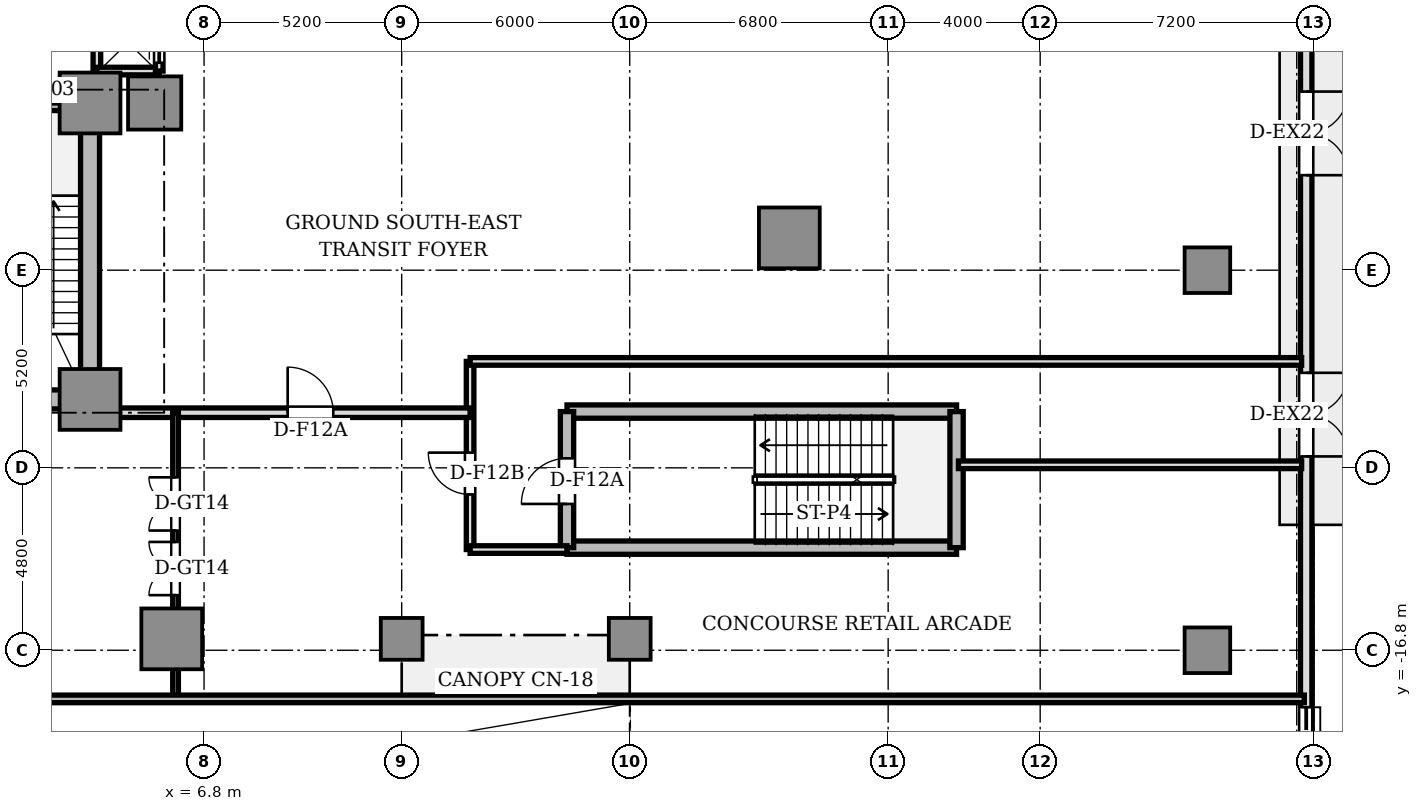
"""IFC4 building model, lengths in metres.
Left out: names, types, materials, properties, quantities, classifications, styles, units other than length and angle.
Written with IfcOpenShell. Run it as: python <this file> out.ifc"""

import sys

from ifc_helpers import new_model, si_unit, direction, frame, frame_2d, origin, origin_2d, place, context, subcontext, project, spatial, rectangle, circle, extrude, source, transform, mapped, element, fill, save


model = new_model("IFC4")
c1 = context("Model", 3, precision=1e-05, world=origin(), true_north=direction((0.0, 1.0)))
c2 = subcontext(c1, "Body", "Model", "MODEL_VIEW")
j1 = project(units=[si_unit("LENGTHUNIT", "METRE"), si_unit("PLANEANGLEUNIT", "RADIAN")], contexts=[c1])
p1 = place(None, origin())
s1 = spatial("IfcSite", under=j1, at=p1, CompositionType="ELEMENT")
p2 = place(p1, origin())
s2 = spatial("IfcBuilding", under=s1, at=p2, CompositionType="ELEMENT")
p3 = place(p2, origin())
s3 = spatial("IfcBuildingStorey", under=s2, at=p3, CompositionType="ELEMENT", Elevation=0.0)
p4 = place(p3, frame((-3.55, -10.2, 0.0), z_axis=(0.0, 0.0, 1.0), x_axis=(1.0, 0.0, 0.0)))
e1 = element("IfcWall", 1, at=p4, inside=s3, PredefinedType="SHEAR", context=c2, shape_type="SweptSolid", body=[
    extrude(rectangle(XDim=7.1, YDim=0.5, at=frame_2d((3.55, 0.0))), origin(), (0.0, 0.0, 1.0), 4.48),
])
p5 = place(p3, frame((3.8, -9.75, 0.0), z_axis=(0.0, 0.0, 1.0), x_axis=(0.0, 1.0, 0.0)))
e2 = element("IfcWall", 2, at=p5, inside=s3, PredefinedType="SHEAR", context=c2, shape_type="SweptSolid", body=[
    extrude(rectangle(XDim=6.9, YDim=0.5, at=frame_2d((3.45, 0.0))), origin(), (0.0, 0.0, 1.0), 4.48),
])
m1 = source(origin(), c2, "Body", "SweptSolid", [
    extrude(rectangle(XDim=1.6, YDim=1.6, at=origin_2d()), origin(), (0.0, 0.0, 1.0), 4.48),
])
for number, where, z_axis, x_axis in (
    (3, (3.8, -2.4, 0.0), (0.0, 0.0, 1.0), (1.0, 0.0, 0.0)),
    (4, (3.8, -10.2, 0.0), (0.0, 0.0, 1.0), (1.0, 0.0, 0.0)),
):
    element("IfcColumn", number, at=place(p3, frame(where, z_axis=z_axis, x_axis=x_axis)), inside=s3, PredefinedType="COLUMN", context=c2, shape_type="MappedRepresentation", body=[
        mapped(m1, transform((0.0, 0.0, 0.0), scale=1.0)),
    ])
m2 = source(origin(), c2, "Body", "SweptSolid", [
    extrude(rectangle(XDim=1.4, YDim=1.4, at=origin_2d()), origin(), (0.0, 0.0, 1.0), 4.48),
])
p6 = place(p3, frame((5.5, -2.4, 0.0), z_axis=(0.0, 0.0, 1.0), x_axis=(1.0, 0.0, 0.0)))
e5 = element("IfcColumn", 5, at=p6, inside=s3, PredefinedType="COLUMN", context=c2, shape_type="MappedRepresentation", body=[
    mapped(m2, transform((0.0, 0.0, 0.0), scale=1.0)),
])
for number, where, z_axis, x_axis in (
    (6, (22.2, -5.95, 0.0), (0.0, 0.0, 1.0), (1.0, 0.0, 0.0)),
    (7, (5.95, -16.5, 0.0), (0.0, 0.0, 1.0), (1.0, 0.0, 0.0)),
):
    element("IfcColumn", number, at=place(p3, frame(where, z_axis=z_axis, x_axis=x_axis)), inside=s3, PredefinedType="COLUMN", context=c2, shape_type="MappedRepresentation", body=[
        mapped(m1, transform((0.0, 0.0, 0.0), scale=1.0)),
    ])
m3 = source(origin(), c2, "Body", "SweptSolid", [
    extrude(rectangle(XDim=1.2, YDim=1.2, at=origin_2d()), origin(), (0.0, 0.0, 1.0), 4.48),
])
for number, where, z_axis, x_axis in (
    (8, (33.2, -16.8, 0.0), (0.0, 0.0, 1.0), (1.0, 0.0, 0.0)),
    (9, (33.2, -6.8, 0.0), (0.0, 0.0, 1.0), (1.0, 0.0, 0.0)),
):
    element("IfcColumn", number, at=place(p3, frame(where, z_axis=z_axis, x_axis=x_axis)), inside=s3, PredefinedType="COLUMN", context=c2, shape_type="MappedRepresentation", body=[
        mapped(m3, transform((0.0, 0.0, 0.0), scale=1.0)),
    ])
m4 = source(origin(), c2, "Body", "SweptSolid", [
    extrude(circle(Radius=0.55, at=origin_2d()), origin(), (0.0, 0.0, 1.0), 4.48),
])
for number, where, z_axis, x_axis in (
    (10, (12.0, -16.5, 0.0), (0.0, 0.0, 1.0), (1.0, 0.0, 0.0)),
    (11, (18.0, -16.5, 0.0), (0.0, 0.0, 1.0), (1.0, 0.0, 0.0)),
):
    element("IfcColumn", number, at=place(p3, frame(where, z_axis=z_axis, x_axis=x_axis)), inside=s3, PredefinedType="COLUMN", context=c2, shape_type="MappedRepresentation", body=[
        mapped(m4, transform((0.0, 0.0, 0.0), scale=1.0)),
    ])
p7 = place(p3, frame((35.8, 22.6, 0.0), z_axis=(0.0, 0.0, 1.0), x_axis=(0.0, -1.0, 0.0)))
e12 = element("IfcWall", 12, at=p7, inside=s3, PredefinedType="STANDARD", context=c2, shape_type="SweptSolid", body=[
    extrude(rectangle(XDim=47.1, YDim=0.3, at=frame_2d((23.55, 0.0))), origin(), (0.0, 0.0, 1.0), 3.8),
])
p8 = place(p7, frame((10.9, 0.0, 0.0)))
e13 = element("IfcOpeningElement", 13, at=p8, cuts=e12, PredefinedType="OPENING", context=c2, shape_type="SweptSolid", body=[
    extrude(rectangle(XDim=2.2, YDim=2.4, at=frame_2d((1.1, 1.2))), frame((0.0, 0.16, 0.0), z_axis=(0.0, -1.0, 0.0), x_axis=(1.0, 0.0, 0.0)), (0.0, 0.0, 1.0), 0.32),
])
p9 = place(p7, frame((13.24, 0.0, 0.0)))
e14 = element("IfcOpeningElement", 14, at=p9, cuts=e12, PredefinedType="OPENING", context=c2, shape_type="SweptSolid", body=[
    extrude(rectangle(XDim=2.2, YDim=2.4, at=frame_2d((1.1, 1.2))), frame((0.0, 0.16, 0.0), z_axis=(0.0, -1.0, 0.0), x_axis=(1.0, 0.0, 0.0)), (0.0, 0.0, 1.0), 0.32),
])
p10 = place(p7, frame((24.7, 0.0, 0.0)))
e15 = element("IfcOpeningElement", 15, at=p10, cuts=e12, PredefinedType="OPENING", context=c2, shape_type="SweptSolid", body=[
    extrude(rectangle(XDim=2.2, YDim=2.4, at=frame_2d((1.1, 1.2))), frame((0.0, 0.16, 0.0), z_axis=(0.0, -1.0, 0.0), x_axis=(1.0, 0.0, 0.0)), (0.0, 0.0, 1.0), 0.32),
])
p11 = place(p7, frame((32.1, 0.0, 0.0)))
e16 = element("IfcOpeningElement", 16, at=p11, cuts=e12, PredefinedType="OPENING", context=c2, shape_type="SweptSolid", body=[
    extrude(rectangle(XDim=2.2, YDim=2.4, at=frame_2d((1.1, 1.2))), frame((0.0, 0.16, 0.0), z_axis=(0.0, -1.0, 0.0), x_axis=(1.0, 0.0, 0.0)), (0.0, 0.0, 1.0), 0.32),
])
p12 = place(p7, frame((40.9, 0.0, 0.0)))
e17 = element("IfcOpeningElement", 17, at=p12, cuts=e12, PredefinedType="OPENING", context=c2, shape_type="SweptSolid", body=[
    extrude(rectangle(XDim=6.0, YDim=2.8, at=frame_2d((3.0, 1.4))), frame((0.0, 0.16, 0.0), z_axis=(0.0, -1.0, 0.0), x_axis=(1.0, 0.0, 0.0)), (0.0, 0.0, 1.0), 0.32),
])
p13 = place(p3, frame((0.0, -2.5, 0.0), z_axis=(0.0, 0.0, 1.0), x_axis=(1.0, 0.0, 0.0)))
e18 = element("IfcWall", 18, at=p13, inside=s3, PredefinedType="SOLIDWALL", context=c2, shape_type="SweptSolid", body=[
    extrude(rectangle(XDim=3.72, YDim=0.2, at=frame_2d((1.86, 0.0))), origin(), (0.0, 0.0, 1.0), 4.48),
])
p14 = place(p3, frame((3.98, -1.56, 0.0), z_axis=(0.0, 0.0, 1.0), x_axis=(0.0, 1.0, 0.0)))
e19 = element("IfcWall", 19, at=p14, inside=s3, PredefinedType="SOLIDWALL", context=c2, shape_type="SweptSolid", body=[
    extrude(rectangle(XDim=3.12, YDim=0.2, at=frame_2d((1.56, 0.0))), origin(), (0.0, 0.0, 1.0), 3.55),
])
p15 = place(p3, frame((3.98, -1.56, 0.0), z_axis=(0.0, 0.0, 1.0), x_axis=(1.0, 0.0, 0.0)))
e20 = element("IfcWall", 20, at=p15, inside=s3, PredefinedType="SOLIDWALL", context=c2, shape_type="SweptSolid", body=[
    extrude(rectangle(XDim=1.64, YDim=0.2, at=frame_2d((0.82, 0.0))), origin(), (0.0, 0.0, 1.0), 4.03),
])
p16 = place(p3, frame((5.62, -1.56, 0.0), z_axis=(0.0, 0.0, 1.0), x_axis=(0.0, 1.0, 0.0)))
e21 = element("IfcWall", 21, at=p16, inside=s3, PredefinedType="SOLIDWALL", context=c2, shape_type="SweptSolid", body=[
    extrude(rectangle(XDim=1.56, YDim=0.2, at=frame_2d((0.78, 0.0))), origin(), (0.0, 0.0, 1.0), 4.03),
])
p17 = place(p16, frame((0.22, 0.0, 0.0)))
e22 = element("IfcOpeningElement", 22, at=p17, cuts=e21, PredefinedType="OPENING", context=c2, shape_type="SweptSolid", body=[
    extrude(rectangle(XDim=1.1, YDim=2.2, at=frame_2d((0.55, 1.1))), frame((0.0, 0.11, 0.0), z_axis=(0.0, -1.0, 0.0), x_axis=(1.0, 0.0, 0.0)), (0.0, 0.0, 1.0), 0.22),
])
for number, where, z_axis, x_axis in (
    (23, (16.35, -10.52, 0.0), (0.0, 0.0, 1.0), (1.0, 0.0, 0.0)),
    (24, (16.35, -14.1, 0.0), (0.0, 0.0, 1.0), (1.0, 0.0, 0.0)),
):
    element("IfcWall", number, at=place(p3, frame(where, z_axis=z_axis, x_axis=x_axis)), inside=s3, PredefinedType="SHEAR", context=c2, shape_type="SweptSolid", body=[
        extrude(rectangle(XDim=10.25, YDim=0.35, at=frame_2d((5.125, 0.0))), origin(), (0.0, 0.0, 1.0), 4.48),
    ])
p18 = place(p3, frame((16.35, -14.1, 0.0), z_axis=(0.0, 0.0, 1.0), x_axis=(0.0, 1.0, 0.0)))
e25 = element("IfcWall", 25, at=p18, inside=s3, PredefinedType="SHEAR", context=c2, shape_type="SweptSolid", body=[
    extrude(rectangle(XDim=3.58, YDim=0.35, at=frame_2d((1.79, 0.0))), origin(), (0.0, 0.0, 1.0), 4.48),
])
p19 = place(p18, frame((1.15, 0.0, 0.0)))
e26 = element("IfcOpeningElement", 26, at=p19, cuts=e25, PredefinedType="OPENING", context=c2, shape_type="SweptSolid", body=[
    extrude(rectangle(XDim=1.2, YDim=2.2, at=frame_2d((0.6, 1.1))), frame((0.0, 0.185, 0.0), z_axis=(0.0, -1.0, 0.0), x_axis=(1.0, 0.0, 0.0)), (0.0, 0.0, 1.0), 0.37),
])
p20 = place(p3, frame((26.6, -14.1, 0.0), z_axis=(0.0, 0.0, 1.0), x_axis=(0.0, 1.0, 0.0)))
e27 = element("IfcWall", 27, at=p20, inside=s3, PredefinedType="SHEAR", context=c2, shape_type="SweptSolid", body=[
    extrude(rectangle(XDim=3.58, YDim=0.35, at=frame_2d((1.79, 0.0))), origin(), (0.0, 0.0, 1.0), 4.48),
])
p21 = place(p3, frame((13.8, -14.15, 0.0), z_axis=(0.0, 0.0, 1.0), x_axis=(0.0, 1.0, 0.0)))
e28 = element("IfcWall", 28, at=p21, inside=s3, PredefinedType="SOLIDWALL", context=c2, shape_type="SweptSolid", body=[
    extrude(rectangle(XDim=4.95, YDim=0.2, at=frame_2d((2.475, 0.0))), origin(), (0.0, 0.0, 1.0), 4.03),
])
p22 = place(p21, frame((1.45, 0.0, 0.0)))
e29 = element("IfcOpeningElement", 29, at=p22, cuts=e28, PredefinedType="OPENING", context=c2, shape_type="SweptSolid", body=[
    extrude(rectangle(XDim=1.1, YDim=2.15, at=frame_2d((0.55, 1.075))), frame((0.0, 0.11, 0.0), z_axis=(0.0, -1.0, 0.0), x_axis=(1.0, 0.0, 0.0)), (0.0, 0.0, 1.0), 0.22),
])
p23 = place(p3, frame((13.8, -14.15, 0.0), z_axis=(0.0, 0.0, 1.0), x_axis=(1.0, 0.0, 0.0)))
e30 = element("IfcWall", 30, at=p23, inside=s3, PredefinedType="SOLIDWALL", context=c2, shape_type="SweptSolid", body=[
    extrude(rectangle(XDim=2.55, YDim=0.2, at=frame_2d((1.275, 0.0))), origin(), (0.0, 0.0, 1.0), 4.03),
])
p24 = place(p3, frame((13.8, -9.2, 0.0), z_axis=(0.0, 0.0, 1.0), x_axis=(1.0, 0.0, 0.0)))
e31 = element("IfcWall", 31, at=p24, inside=s3, PredefinedType="SOLIDWALL", context=c2, shape_type="SweptSolid", body=[
    extrude(rectangle(XDim=21.88, YDim=0.2, at=frame_2d((10.94, 0.0))), origin(), (0.0, 0.0, 1.0), 3.95),
])
p25 = place(p3, frame((26.65, -11.92, 0.0), z_axis=(0.0, 0.0, 1.0), x_axis=(1.0, 0.0, 0.0)))
e32 = element("IfcWall", 32, at=p25, inside=s3, PredefinedType="SOLIDWALL", context=c2, shape_type="SweptSolid", body=[
    extrude(rectangle(XDim=9.03, YDim=0.2, at=frame_2d((4.515, 0.0))), origin(), (0.0, 0.0, 1.0), 4.03),
])
p26 = place(p3, frame((4.0, -10.55, 0.0), z_axis=(0.0, 0.0, 1.0), x_axis=(1.0, 0.0, 0.0)))
e33 = element("IfcWall", 33, at=p26, inside=s3, PredefinedType="SOLIDWALL", context=c2, shape_type="SweptSolid", body=[
    extrude(rectangle(XDim=9.8, YDim=0.25, at=frame_2d((4.9, 0.0))), origin(), (0.0, 0.0, 1.0), 4.03),
])
p27 = place(p26, frame((5.0, 0.0, 0.0)))
e34 = element("IfcOpeningElement", 34, at=p27, cuts=e33, PredefinedType="OPENING", context=c2, shape_type="SweptSolid", body=[
    extrude(rectangle(XDim=1.2, YDim=2.2, at=frame_2d((0.6, 1.1))), frame((0.0, 0.135, 0.0), z_axis=(0.0, -1.0, 0.0), x_axis=(1.0, 0.0, 0.0)), (0.0, 0.0, 1.0), 0.27),
])
p28 = place(p3, frame((6.05, -18.05, 0.0), z_axis=(0.0, 0.0, 1.0), x_axis=(0.0, 1.0, 0.0)))
e35 = element("IfcWall", 35, at=p28, inside=s3, PredefinedType="PARTITIONING", context=c2, shape_type="SweptSolid", body=[
    extrude(rectangle(XDim=7.5, YDim=0.15, at=frame_2d((3.75, 0.0))), origin(), (0.0, 0.0, 1.0), 3.85),
])
p29 = place(p28, frame((2.7, 0.0, 0.0)))
e36 = element("IfcOpeningElement", 36, at=p29, cuts=e35, PredefinedType="OPENING", context=c2, shape_type="SweptSolid", body=[
    extrude(rectangle(XDim=1.4, YDim=2.1, at=frame_2d((0.7, 1.05))), frame((0.0, 0.085, 0.0), z_axis=(0.0, -1.0, 0.0), x_axis=(1.0, 0.0, 0.0)), (0.0, 0.0, 1.0), 0.17),
])
p30 = place(p28, frame((4.4, 0.0, 0.0)))
e37 = element("IfcOpeningElement", 37, at=p30, cuts=e35, PredefinedType="OPENING", context=c2, shape_type="SweptSolid", body=[
    extrude(rectangle(XDim=1.4, YDim=2.1, at=frame_2d((0.7, 1.05))), frame((0.0, 0.085, 0.0), z_axis=(0.0, -1.0, 0.0), x_axis=(1.0, 0.0, 0.0)), (0.0, 0.0, 1.0), 0.17),
])
p31 = place(p3, frame((-18.1, -18.08, 0.0), z_axis=(0.0, 0.0, 1.0), x_axis=(1.0, 0.0, 0.0)))
e38 = element("IfcWall", 38, at=p31, inside=s3, PredefinedType="SOLIDWALL", context=c2, shape_type="SweptSolid", body=[
    extrude(rectangle(XDim=53.85, YDim=0.2, at=frame_2d((26.925, 0.0))), origin(), (0.0, 0.0, 1.0), 4.48),
])
m5 = source(origin(), c2, "Body", "SweptSolid", [
    extrude(rectangle(XDim=2.2, YDim=0.05, at=origin_2d()), origin(), (0.0, 0.0, 1.0), 2.4),
])
p32 = place(p10, frame((1.1, 0.0, 0.0)))
e39 = element("IfcDoor", 39, at=p32, inside=s3, OperationType="DOUBLE_DOOR_SINGLE_SWING", PredefinedType="DOOR", context=c2, shape_type="MappedRepresentation", body=[
    mapped(m5, transform((0.0, 0.0, 0.0), scale=1.0)),
])
fill(e15, e39)
p33 = place(p11, frame((1.1, 0.0, 0.0)))
e40 = element("IfcDoor", 40, at=p33, inside=s3, OperationType="DOUBLE_DOOR_SINGLE_SWING", PredefinedType="DOOR", context=c2, shape_type="MappedRepresentation", body=[
    mapped(m5, transform((0.0, 0.0, 0.0), scale=1.0)),
])
fill(e16, e40)
m6 = source(origin(), c2, "Body", "SweptSolid", [
    extrude(rectangle(XDim=6.0, YDim=0.05, at=origin_2d()), origin(), (0.0, 0.0, 1.0), 2.8),
])
p34 = place(p12, frame((3.0, 0.0, 0.0)))
e41 = element("IfcDoor", 41, at=p34, inside=s3, OperationType="ROLLINGUP", PredefinedType="DOOR", context=c2, shape_type="MappedRepresentation", body=[
    mapped(m6, transform((0.0, 0.0, 0.0), scale=1.0)),
])
fill(e17, e41)
m7 = source(origin(), c2, "Body", "SweptSolid", [
    extrude(rectangle(XDim=1.1, YDim=0.05, at=origin_2d()), origin(), (0.0, 0.0, 1.0), 2.2),
])
p35 = place(p17, frame((0.55, 0.0, 0.0)))
e42 = element("IfcDoor", 42, at=p35, inside=s3, OperationType="DOUBLE_DOOR_SLIDING", PredefinedType="DOOR", context=c2, shape_type="MappedRepresentation", body=[
    mapped(m7, transform((0.0, 0.0, 0.0), scale=1.0)),
])
fill(e22, e42)
m8 = source(origin(), c2, "Body", "SweptSolid", [
    extrude(rectangle(XDim=1.2, YDim=0.05, at=origin_2d()), origin(), (0.0, 0.0, 1.0), 2.2),
])
p36 = place(p19, frame((0.6, 0.0, 0.0)))
e43 = element("IfcDoor", 43, at=p36, inside=s3, OperationType="SINGLE_SWING_LEFT", PredefinedType="DOOR", context=c2, shape_type="MappedRepresentation", body=[
    mapped(m8, transform((0.0, 0.0, 0.0), scale=1.0)),
])
fill(e26, e43)
m9 = source(origin(), c2, "Body", "SweptSolid", [
    extrude(rectangle(XDim=1.1, YDim=0.05, at=origin_2d()), origin(), (0.0, 0.0, 1.0), 2.15),
])
p37 = place(p22, frame((0.55, 0.0, 0.0)))
e44 = element("IfcDoor", 44, at=p37, inside=s3, OperationType="SINGLE_SWING_RIGHT", PredefinedType="DOOR", context=c2, shape_type="MappedRepresentation", body=[
    mapped(m9, transform((0.0, 0.0, 0.0), scale=1.0)),
])
fill(e29, e44)
p38 = place(p27, frame((0.6, 0.0, 0.0)))
e45 = element("IfcDoor", 45, at=p38, inside=s3, OperationType="SINGLE_SWING_LEFT", PredefinedType="DOOR", context=c2, shape_type="MappedRepresentation", body=[
    mapped(m8, transform((0.0, 0.0, 0.0), scale=1.0)),
])
fill(e34, e45)
m10 = source(origin(), c2, "Body", "SweptSolid", [
    extrude(rectangle(XDim=1.4, YDim=0.05, at=origin_2d()), origin(), (0.0, 0.0, 1.0), 2.1),
])
p39 = place(p29, frame((0.7, 0.0, 0.0)))
e46 = element("IfcDoor", 46, at=p39, inside=s3, OperationType="DOUBLE_DOOR_SINGLE_SWING", PredefinedType="GATE", context=c2, shape_type="MappedRepresentation", body=[
    mapped(m10, transform((0.0, 0.0, 0.0), scale=1.0)),
])
fill(e36, e46)
p40 = place(p30, frame((0.7, 0.0, 0.0)))
e47 = element("IfcDoor", 47, at=p40, inside=s3, OperationType="DOUBLE_DOOR_SINGLE_SWING", PredefinedType="GATE", context=c2, shape_type="MappedRepresentation", body=[
    mapped(m10, transform((0.0, 0.0, 0.0), scale=1.0)),
])
fill(e37, e47)
save(model, sys.argv[1])
